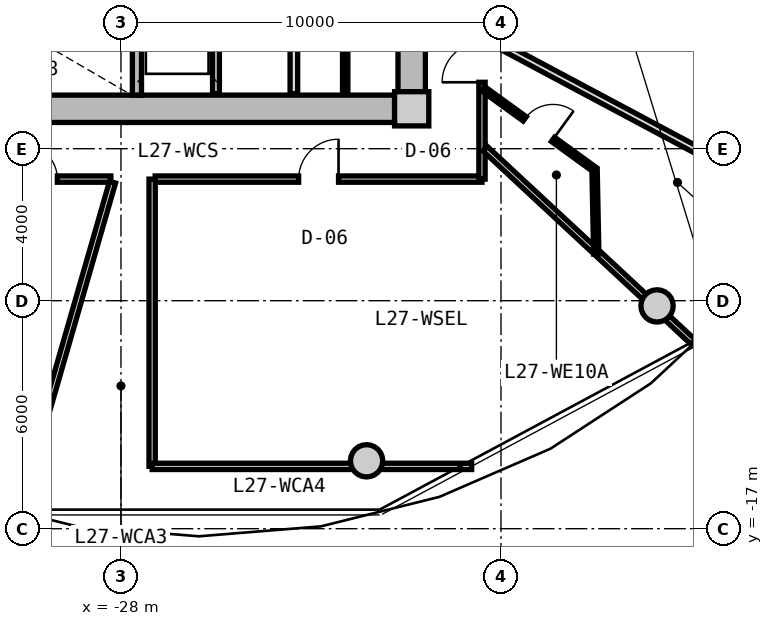
"""IFC4 building model, lengths in metres.
Left out: names, types, materials, properties, quantities, classifications, styles, units other than length and angle.
Written with IfcOpenShell. Run it as: python <this file> out.ifc"""

import sys

from ifc_helpers import new_model, si_unit, direction, frame, frame_2d, origin, origin_2d, place, context, subcontext, project, spatial, rectangle, circle, extrude, source, transform, mapped, element, fill, save


model = new_model("IFC4")
c1 = context("Model", 3, precision=1e-05, world=origin(), true_north=direction((0.0, 1.0)))
c2 = subcontext(c1, "Body", "Model", "MODEL_VIEW")
j1 = project(units=[si_unit("LENGTHUNIT", "METRE"), si_unit("PLANEANGLEUNIT", "RADIAN")], contexts=[c1])
p1 = place(None, origin())
s1 = spatial("IfcSite", under=j1, at=p1, CompositionType="ELEMENT")
p2 = place(p1, origin())
s2 = spatial("IfcBuilding", under=s1, at=p2, CompositionType="ELEMENT")
p3 = place(p2, frame((0.0, 0.0, 90.15)))
s3 = spatial("IfcBuildingStorey", under=s2, at=p3, CompositionType="ELEMENT", Elevation=90.15)
m1 = source(origin(), c2, "Body", "SweptSolid", [
    extrude(rectangle(XDim=0.9, YDim=0.9, at=origin_2d()), origin(), (0.0, 0.0, 1.0), 3.05),
])
p4 = place(p3, frame((-20.35, -5.95, 0.0), z_axis=(0.0, 0.0, 1.0), x_axis=(1.0, 0.0, 0.0)))
e1 = element("IfcColumn", 1, at=p4, inside=s3, PredefinedType="COLUMN", context=c2, shape_type="MappedRepresentation", body=[
    mapped(m1, transform((0.0, 0.0, 0.0), x_axis=(1.0, 0.0, 0.0), y_axis=(0.0, 1.0, 0.0), z_axis=(0.0, 0.0, 1.0), scale=1.0)),
])
m2 = source(origin(), c2, "Body", "SweptSolid", [
    extrude(rectangle(XDim=14.4, YDim=0.72, at=frame_2d((7.2, 0.0))), origin(), (0.0, 0.0, 1.0), 2.79),
])
p5 = place(p3, frame((-20.8, -5.95, 0.0), z_axis=(0.0, 0.0, 1.0), x_axis=(-1.0, 0.0, 0.0)))
e2 = element("IfcWall", 2, at=p5, inside=s3, PredefinedType="SHEAR", context=c2, shape_type="MappedRepresentation", body=[
    mapped(m2, transform((0.0, 0.0, 0.0), x_axis=(1.0, 0.0, 0.0), y_axis=(0.0, 1.0, 0.0), z_axis=(0.0, 0.0, 1.0), scale=1.0)),
])
m3 = source(origin(), c2, "Body", "SweptSolid", [
    extrude(rectangle(XDim=11.0, YDim=0.72, at=frame_2d((5.5, 0.0))), origin(), (0.0, 0.0, 1.0), 2.79),
])
p6 = place(p3, frame((-20.35, 5.5, 0.0), z_axis=(0.0, 0.0, 1.0), x_axis=(0.0, -1.0, 0.0)))
e3 = element("IfcWall", 3, at=p6, inside=s3, PredefinedType="SHEAR", context=c2, shape_type="MappedRepresentation", body=[
    mapped(m3, transform((0.0, 0.0, 0.0), x_axis=(1.0, 0.0, 0.0), y_axis=(0.0, 1.0, 0.0), z_axis=(0.0, 0.0, 1.0), scale=1.0)),
])
p7 = place(p6, frame((5.65, 0.0, 0.0)))
e4 = element("IfcOpeningElement", 4, at=p7, cuts=e3, PredefinedType="OPENING", context=c2, shape_type="SweptSolid", body=[
    extrude(rectangle(XDim=1.2, YDim=2.15, at=frame_2d((0.6, 1.075))), frame((0.0, 0.37, 0.0), z_axis=(0.0, -1.0, 0.0), x_axis=(1.0, 0.0, 0.0)), (0.0, 0.0, 1.0), 0.74),
])
m4 = source(origin(), c2, "Body", "SweptSolid", [
    extrude(circle(Radius=0.425, at=origin_2d()), origin(), (0.0, 0.0, 1.0), 3.05),
])
for number, where, z_axis, x_axis in (
    (5, (-21.537, -15.213, 0.0), (0.0, 0.0, 1.0), (1.0, 0.0, 0.0)),
    (6, (-13.894, -11.137, 0.0), (0.0, 0.0, 1.0), (1.0, 0.0, 0.0)),
):
    element("IfcColumn", number, at=place(p3, frame(where, z_axis=z_axis, x_axis=x_axis)), inside=s3, PredefinedType="COLUMN", context=c2, shape_type="MappedRepresentation", body=[
        mapped(m4, transform((0.0, 0.0, 0.0), x_axis=(1.0, 0.0, 0.0), y_axis=(0.0, 1.0, 0.0), z_axis=(0.0, 0.0, 1.0), scale=1.0)),
    ])
m5 = source(origin(), c2, "Body", "SweptSolid", [
    extrude(rectangle(XDim=3.14, YDim=0.24, at=frame_2d((1.57, 0.0))), origin(), (0.0, 0.0, 1.0), 2.79),
])
p8 = place(p3, frame((-27.58, -5.59, 0.0), z_axis=(0.0, 0.0, 1.0), x_axis=(0.0, 1.0, 0.0)))
e7 = element("IfcWall", 7, at=p8, inside=s3, PredefinedType="PARTITIONING", context=c2, shape_type="MappedRepresentation", body=[
    mapped(m5, transform((0.0, 0.0, 0.0), x_axis=(1.0, 0.0, 0.0), y_axis=(0.0, 1.0, 0.0), z_axis=(0.0, 0.0, 1.0), scale=1.0)),
])
m6 = source(origin(), c2, "Body", "SweptSolid", [
    extrude(rectangle(XDim=3.8, YDim=0.2, at=frame_2d((1.9, 0.0))), origin(), (0.0, 0.0, 1.0), 2.775),
])
p9 = place(p3, frame((-23.45, -5.55, 0.0), z_axis=(0.0, 0.0, 1.0), x_axis=(0.0, 1.0, 0.0)))
e8 = element("IfcWall", 8, at=p9, inside=s3, PredefinedType="PARTITIONING", context=c2, shape_type="MappedRepresentation", body=[
    mapped(m6, transform((0.0, 0.0, 0.0), x_axis=(1.0, 0.0, 0.0), y_axis=(0.0, 1.0, 0.0), z_axis=(0.0, 0.0, 1.0), scale=1.0)),
])
m7 = source(origin(), c2, "Body", "SweptSolid", [
    extrude(rectangle(XDim=3.22, YDim=0.18, at=frame_2d((1.61, 0.0))), origin(), (0.0, 0.0, 1.0), 2.775),
])
p10 = place(p3, frame((-25.5, -5.55, 0.0), z_axis=(0.0, 0.0, 1.0), x_axis=(0.0, 1.0, 0.0)))
e9 = element("IfcWall", 9, at=p10, inside=s3, PredefinedType="PARTITIONING", context=c2, shape_type="MappedRepresentation", body=[
    mapped(m7, transform((0.0, 0.0, 0.0), x_axis=(1.0, 0.0, 0.0), y_axis=(0.0, 1.0, 0.0), z_axis=(0.0, 0.0, 1.0), scale=1.0)),
])
m8 = source(origin(), c2, "Body", "SweptSolid", [
    extrude(rectangle(XDim=3.8, YDim=0.14, at=frame_2d((1.9, 0.0))), origin(), (0.0, 0.0, 1.0), 2.775),
])
p11 = place(p3, frame((-22.1, -5.55, 0.0), z_axis=(0.0, 0.0, 1.0), x_axis=(0.0, 1.0, 0.0)))
e10 = element("IfcWall", 10, at=p11, inside=s3, PredefinedType="PARTITIONING", context=c2, shape_type="MappedRepresentation", body=[
    mapped(m8, transform((0.0, 0.0, 0.0), x_axis=(1.0, 0.0, 0.0), y_axis=(0.0, 1.0, 0.0), z_axis=(0.0, 0.0, 1.0), scale=1.0)),
])
m9 = source(origin(), c2, "Body", "SweptSolid", [
    extrude(rectangle(XDim=8.6, YDim=0.165, at=frame_2d((4.3, 0.0))), origin(), (0.0, 0.0, 1.0), 2.775),
])
p12 = place(p3, frame((-18.5, -7.8, 0.0), z_axis=(0.0, 0.0, 1.0), x_axis=(-1.0, 0.0, 0.0)))
e11 = element("IfcWall", 11, at=p12, inside=s3, PredefinedType="PARTITIONING", context=c2, shape_type="MappedRepresentation", body=[
    mapped(m9, transform((0.0, 0.0, 0.0), x_axis=(1.0, 0.0, 0.0), y_axis=(0.0, 1.0, 0.0), z_axis=(0.0, 0.0, 1.0), scale=1.0)),
])
p13 = place(p12, frame((3.775, 0.0, 0.0)))
e12 = element("IfcOpeningElement", 12, at=p13, cuts=e11, PredefinedType="OPENING", context=c2, shape_type="SweptSolid", body=[
    extrude(rectangle(XDim=1.05, YDim=2.15, at=frame_2d((0.525, 1.075))), frame((0.0, 0.093, 0.0), z_axis=(0.0, -1.0, 0.0), x_axis=(1.0, 0.0, 0.0)), (0.0, 0.0, 1.0), 0.185),
])
m10 = source(origin(), c2, "Body", "SweptSolid", [
    extrude(rectangle(XDim=9.234, YDim=0.165, at=frame_2d((4.617, 0.0))), origin(), (0.0, 0.0, 1.0), 2.775),
])
p14 = place(p3, frame((-28.266, -7.8, 0.0), z_axis=(0.0, 0.0, 1.0), x_axis=(-1.0, 0.0, 0.0)))
e13 = element("IfcWall", 13, at=p14, inside=s3, PredefinedType="PARTITIONING", context=c2, shape_type="MappedRepresentation", body=[
    mapped(m10, transform((0.0, 0.0, 0.0), x_axis=(1.0, 0.0, 0.0), y_axis=(0.0, 1.0, 0.0), z_axis=(0.0, 0.0, 1.0), scale=1.0)),
])
p15 = place(p14, frame((4.392, 0.0, 0.0)))
e14 = element("IfcOpeningElement", 14, at=p15, cuts=e13, PredefinedType="OPENING", context=c2, shape_type="SweptSolid", body=[
    extrude(rectangle(XDim=0.92, YDim=2.1, at=frame_2d((0.46, 1.05))), frame((0.0, 0.093, 0.0), z_axis=(0.0, -1.0, 0.0), x_axis=(1.0, 0.0, 0.0)), (0.0, 0.0, 1.0), 0.185),
])
p16 = place(p14, frame((1.408, 0.0, 0.0)))
e15 = element("IfcOpeningElement", 15, at=p16, cuts=e13, PredefinedType="OPENING", context=c2, shape_type="SweptSolid", body=[
    extrude(rectangle(XDim=0.92, YDim=2.1, at=frame_2d((0.46, 1.05))), frame((0.0, 0.093, 0.0), z_axis=(0.0, -1.0, 0.0), x_axis=(1.0, 0.0, 0.0)), (0.0, 0.0, 1.0), 0.185),
])
m11 = source(origin(), c2, "Body", "SweptSolid", [
    extrude(rectangle(XDim=15.6, YDim=0.165, at=frame_2d((7.8, 0.0))), origin(), (0.0, 0.0, 1.0), 2.775),
])
p17 = place(p3, frame((-18.5, 7.8, 0.0), z_axis=(0.0, 0.0, 1.0), x_axis=(0.0, -1.0, 0.0)))
e16 = element("IfcWall", 16, at=p17, inside=s3, PredefinedType="PARTITIONING", context=c2, shape_type="MappedRepresentation", body=[
    mapped(m11, transform((0.0, 0.0, 0.0), x_axis=(1.0, 0.0, 0.0), y_axis=(0.0, 1.0, 0.0), z_axis=(0.0, 0.0, 1.0), scale=1.0)),
])
p18 = place(p17, frame((12.002, 0.0, 0.0)))
e17 = element("IfcOpeningElement", 17, at=p18, cuts=e16, PredefinedType="OPENING", context=c2, shape_type="SweptSolid", body=[
    extrude(rectangle(XDim=1.05, YDim=2.15, at=frame_2d((0.525, 1.075))), frame((0.0, 0.093, 0.0), z_axis=(0.0, -1.0, 0.0), x_axis=(1.0, 0.0, 0.0)), (0.0, 0.0, 1.0), 0.185),
])
p19 = place(p17, frame((10.211, 0.0, 0.0)))
e18 = element("IfcOpeningElement", 18, at=p19, cuts=e16, PredefinedType="OPENING", context=c2, shape_type="SweptSolid", body=[
    extrude(rectangle(XDim=1.05, YDim=2.15, at=frame_2d((0.525, 1.075))), frame((0.0, 0.093, 0.0), z_axis=(0.0, -1.0, 0.0), x_axis=(1.0, 0.0, 0.0)), (0.0, 0.0, 1.0), 0.185),
])
p20 = place(p17, frame((7.722, 0.0, 0.0)))
e19 = element("IfcOpeningElement", 19, at=p20, cuts=e16, PredefinedType="OPENING", context=c2, shape_type="SweptSolid", body=[
    extrude(rectangle(XDim=1.05, YDim=2.15, at=frame_2d((0.525, 1.075))), frame((0.0, 0.093, 0.0), z_axis=(0.0, -1.0, 0.0), x_axis=(1.0, 0.0, 0.0)), (0.0, 0.0, 1.0), 0.185),
])
p21 = place(p17, frame((6.291, 0.0, 0.0)))
e20 = element("IfcOpeningElement", 20, at=p21, cuts=e16, PredefinedType="OPENING", context=c2, shape_type="SweptSolid", body=[
    extrude(rectangle(XDim=1.05, YDim=2.15, at=frame_2d((0.525, 1.075))), frame((0.0, 0.093, 0.0), z_axis=(0.0, -1.0, 0.0), x_axis=(1.0, 0.0, 0.0)), (0.0, 0.0, 1.0), 0.185),
])
p22 = place(p17, frame((4.296, 0.0, 0.0)))
e21 = element("IfcOpeningElement", 21, at=p22, cuts=e16, PredefinedType="OPENING", context=c2, shape_type="SweptSolid", body=[
    extrude(rectangle(XDim=1.05, YDim=2.15, at=frame_2d((0.525, 1.075))), frame((0.0, 0.093, 0.0), z_axis=(0.0, -1.0, 0.0), x_axis=(1.0, 0.0, 0.0)), (0.0, 0.0, 1.0), 0.185),
])
p23 = place(p17, frame((1.654, 0.0, 0.0)))
e22 = element("IfcOpeningElement", 22, at=p23, cuts=e16, PredefinedType="OPENING", context=c2, shape_type="SweptSolid", body=[
    extrude(rectangle(XDim=1.05, YDim=2.15, at=frame_2d((0.525, 1.075))), frame((0.0, 0.093, 0.0), z_axis=(0.0, -1.0, 0.0), x_axis=(1.0, 0.0, 0.0)), (0.0, 0.0, 1.0), 0.185),
])
m12 = source(origin(), c2, "Body", "SweptSolid", [
    extrude(rectangle(XDim=8.989, YDim=0.165, at=frame_2d((4.495, 0.0))), origin(), (0.0, 0.0, 1.0), 2.275),
])
p24 = place(p3, frame((-28.222, -7.88, 0.0), z_axis=(0.0, 0.0, 1.0), x_axis=(-0.27702323008, -0.960863221274, 0.0)))
e23 = element("IfcWall", 23, at=p24, inside=s3, PredefinedType="PARTITIONING", context=c2, shape_type="MappedRepresentation", body=[
    mapped(m12, transform((0.0, 0.0, 0.0), x_axis=(1.0, 0.0, 0.0), y_axis=(0.0, 1.0, 0.0), z_axis=(0.0, 0.0, 1.0), scale=1.0)),
])
m13 = source(origin(), c2, "Body", "SweptSolid", [
    extrude(rectangle(XDim=7.482, YDim=0.165, at=frame_2d((3.741, 0.0))), origin(), (0.0, 0.0, 1.0), 2.275),
])
p25 = place(p3, frame((-18.42, -6.998, 0.0), z_axis=(0.0, 0.0, 1.0), x_axis=(0.732508698043, -0.680757671489, 0.0)))
e24 = element("IfcWall", 24, at=p25, inside=s3, PredefinedType="PARTITIONING", context=c2, shape_type="MappedRepresentation", body=[
    mapped(m13, transform((0.0, 0.0, 0.0), x_axis=(1.0, 0.0, 0.0), y_axis=(0.0, 1.0, 0.0), z_axis=(0.0, 0.0, 1.0), scale=1.0)),
])
m14 = source(origin(), c2, "Body", "SweptSolid", [
    extrude(rectangle(XDim=7.56, YDim=0.165, at=frame_2d((3.78, 0.0))), origin(), (0.0, 0.0, 1.0), 2.775),
])
p26 = place(p3, frame((-27.18, -15.36, 0.0), z_axis=(0.0, 0.0, 1.0), x_axis=(0.0, 1.0, 0.0)))
e25 = element("IfcWall", 25, at=p26, inside=s3, PredefinedType="PARTITIONING", context=c2, shape_type="MappedRepresentation", body=[
    mapped(m14, transform((0.0, 0.0, 0.0), x_axis=(1.0, 0.0, 0.0), y_axis=(0.0, 1.0, 0.0), z_axis=(0.0, 0.0, 1.0), scale=1.0)),
])
m15 = source(origin(), c2, "Body", "SweptSolid", [
    extrude(rectangle(XDim=8.407, YDim=0.165, at=frame_2d((4.204, 0.0))), origin(), (0.0, 0.0, 1.0), 2.275),
])
p27 = place(p3, frame((-27.18, -15.36, 0.0), z_axis=(0.0, 0.0, 1.0), x_axis=(1.0, 0.0, 0.0)))
e26 = element("IfcWall", 26, at=p27, inside=s3, PredefinedType="PARTITIONING", context=c2, shape_type="MappedRepresentation", body=[
    mapped(m15, transform((0.0, 0.0, 0.0), x_axis=(1.0, 0.0, 0.0), y_axis=(0.0, 1.0, 0.0), z_axis=(0.0, 0.0, 1.0), scale=1.0)),
])
m16 = source(origin(), c2, "Body", "SweptSolid", [
    extrude(rectangle(XDim=10.556, YDim=0.19, at=frame_2d((5.278, 0.0))), origin(), (0.0, 0.0, 1.0), 2.275),
])
p28 = place(p3, frame((-18.42, -1.875, 0.0), z_axis=(0.0, 0.0, 1.0), x_axis=(0.970363857851, -0.241648470667, 0.0)))
e27 = element("IfcWall", 27, at=p28, inside=s3, PredefinedType="PARTITIONING", context=c2, shape_type="MappedRepresentation", body=[
    mapped(m16, transform((0.0, 0.0, 0.0), x_axis=(1.0, 0.0, 0.0), y_axis=(0.0, 1.0, 0.0), z_axis=(0.0, 0.0, 1.0), scale=1.0)),
])
m17 = source(origin(), c2, "Body", "SweptSolid", [
    extrude(rectangle(XDim=8.744, YDim=0.19, at=frame_2d((4.372, 0.0))), origin(), (0.0, 0.0, 1.0), 2.775),
])
p29 = place(p3, frame((-18.273, -4.142, 0.0), z_axis=(0.0, 0.0, 1.0), x_axis=(0.882252449936, -0.470776607938, 0.0)))
e28 = element("IfcWall", 28, at=p29, inside=s3, PredefinedType="PARTITIONING", context=c2, shape_type="MappedRepresentation", body=[
    mapped(m17, transform((0.0, 0.0, 0.0), x_axis=(1.0, 0.0, 0.0), y_axis=(0.0, 1.0, 0.0), z_axis=(0.0, 0.0, 1.0), scale=1.0)),
])
m18 = source(origin(), c2, "Body", "SweptSolid", [
    extrude(rectangle(XDim=3.621, YDim=0.14, at=frame_2d((1.811, 0.0))), origin(), (0.0, 0.0, 1.0), 2.775),
])
p30 = place(p3, frame((-18.47, -5.422, 0.0), z_axis=(0.0, 0.0, 1.0), x_axis=(0.80968252222, -0.586868139544, 0.0)))
e29 = element("IfcWall", 29, at=p30, inside=s3, PredefinedType="PARTITIONING", context=c2, shape_type="MappedRepresentation", body=[
    mapped(m18, transform((0.0, 0.0, 0.0), x_axis=(1.0, 0.0, 0.0), y_axis=(0.0, 1.0, 0.0), z_axis=(0.0, 0.0, 1.0), scale=1.0)),
])
p31 = place(p30, frame((1.351, 0.0, 0.0)))
e30 = element("IfcOpeningElement", 30, at=p31, cuts=e29, PredefinedType="OPENING", context=c2, shape_type="SweptSolid", body=[
    extrude(rectangle(XDim=0.92, YDim=2.1, at=frame_2d((0.46, 1.05))), frame((0.0, 0.08, 0.0), z_axis=(0.0, -1.0, 0.0), x_axis=(1.0, 0.0, 0.0)), (0.0, 0.0, 1.0), 0.16),
])
m19 = source(origin(), c2, "Body", "SweptSolid", [
    extrude(rectangle(XDim=2.225, YDim=0.14, at=frame_2d((1.112, 0.0))), origin(), (0.0, 0.0, 1.0), 2.775),
])
p32 = place(p3, frame((-15.538, -7.547, 0.0), z_axis=(0.0, 0.0, 1.0), x_axis=(0.019971869027, -0.999800542332, 0.0)))
e31 = element("IfcWall", 31, at=p32, inside=s3, PredefinedType="PARTITIONING", context=c2, shape_type="MappedRepresentation", body=[
    mapped(m19, transform((0.0, 0.0, 0.0), x_axis=(1.0, 0.0, 0.0), y_axis=(0.0, 1.0, 0.0), z_axis=(0.0, 0.0, 1.0), scale=1.0)),
])
m20 = source(origin(), c2, "Body", "SweptSolid", [
    extrude(rectangle(XDim=1.05, YDim=2.15, at=frame_2d((0.525, 1.075))), frame((0.0, 0.025, 0.0), z_axis=(0.0, -1.0, 0.0), x_axis=(1.0, 0.0, 0.0)), (0.0, 0.0, 1.0), 0.05),
])
p33 = place(p13, frame((1.05, 0.0, 0.0), z_axis=(0.0, 0.0, 1.0), x_axis=(-1.0, 0.0, 0.0)))
e32 = element("IfcDoor", 32, at=p33, inside=s3, OperationType="SINGLE_SWING_RIGHT", PredefinedType="DOOR", context=c2, shape_type="MappedRepresentation", body=[
    mapped(m20, transform((0.0, 0.0, 0.0), x_axis=(1.0, 0.0, 0.0), y_axis=(0.0, 1.0, 0.0), z_axis=(0.0, 0.0, 1.0), scale=1.0)),
])
fill(e12, e32)
m21 = source(origin(), c2, "Body", "SweptSolid", [
    extrude(rectangle(XDim=0.92, YDim=2.1, at=frame_2d((0.46, 1.05))), frame((0.0, 0.025, 0.0), z_axis=(0.0, -1.0, 0.0), x_axis=(1.0, 0.0, 0.0)), (0.0, 0.0, 1.0), 0.05),
])
p34 = place(p16, frame((0.92, 0.0, 0.0), z_axis=(0.0, 0.0, 1.0), x_axis=(-1.0, 0.0, 0.0)))
e33 = element("IfcDoor", 33, at=p34, inside=s3, OperationType="SINGLE_SWING_LEFT", PredefinedType="DOOR", context=c2, shape_type="MappedRepresentation", body=[
    mapped(m21, transform((0.0, 0.0, 0.0), x_axis=(1.0, 0.0, 0.0), y_axis=(0.0, 1.0, 0.0), z_axis=(0.0, 0.0, 1.0), scale=1.0)),
])
fill(e15, e33)
p35 = place(p18, frame((1.05, 0.0, 0.0), z_axis=(0.0, 0.0, 1.0), x_axis=(-1.0, 0.0, 0.0)))
e34 = element("IfcDoor", 34, at=p35, inside=s3, OperationType="SINGLE_SWING_LEFT", PredefinedType="DOOR", context=c2, shape_type="MappedRepresentation", body=[
    mapped(m20, transform((0.0, 0.0, 0.0), x_axis=(1.0, 0.0, 0.0), y_axis=(0.0, 1.0, 0.0), z_axis=(0.0, 0.0, 1.0), scale=1.0)),
])
fill(e17, e34)
p36 = place(p31, origin())
e35 = element("IfcDoor", 35, at=p36, inside=s3, OperationType="SINGLE_SWING_RIGHT", PredefinedType="DOOR", context=c2, shape_type="MappedRepresentation", body=[
    mapped(m21, transform((0.0, 0.0, 0.0), x_axis=(1.0, 0.0, 0.0), y_axis=(0.0, 1.0, 0.0), z_axis=(0.0, 0.0, 1.0), scale=1.0)),
])
fill(e30, e35)
save(model, sys.argv[1])
